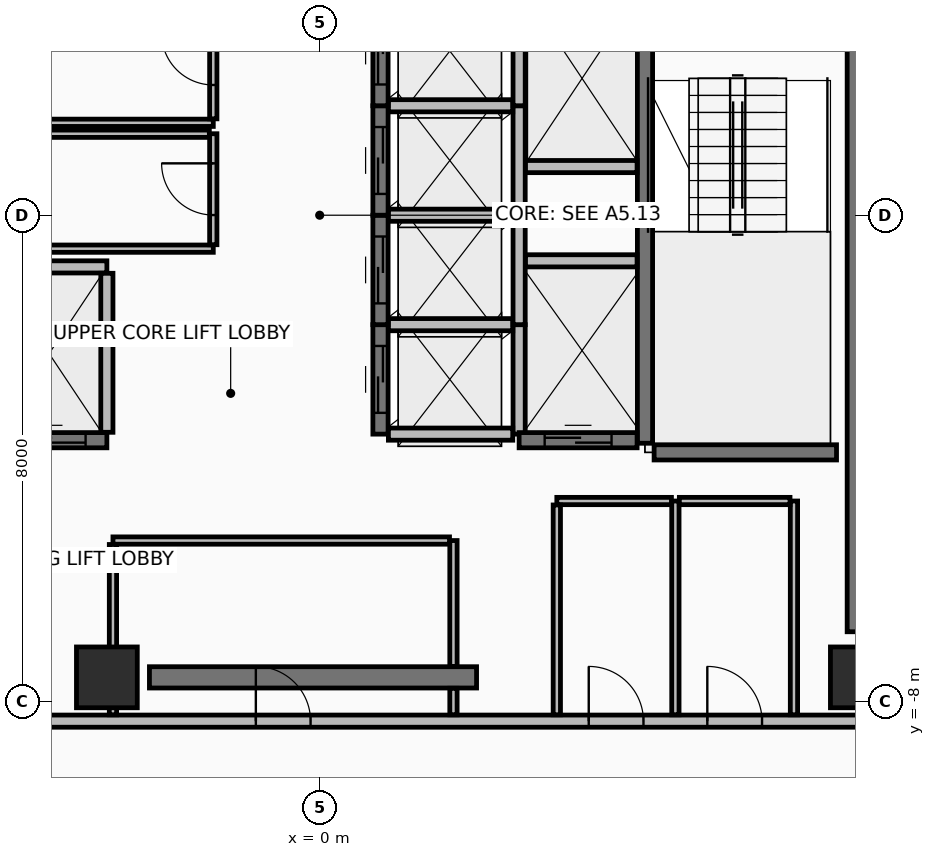
"""IFC4 building model, lengths in metres.
Left out: names, types, materials, properties, quantities, classifications, styles, units other than length and angle.
Written with IfcOpenShell. Run it as: python <this file> out.ifc"""

import sys

from ifc_helpers import new_model, si_unit, direction, frame, frame_2d, origin, origin_2d, place, context, subcontext, project, spatial, rectangle, extrude, element, fill, save


model = new_model("IFC4")
c1 = context("Model", 3, precision=1e-05, world=origin(), true_north=direction((0.0, 1.0)))
c2 = subcontext(c1, "Body", "Model", "MODEL_VIEW")
j1 = project(units=[si_unit("LENGTHUNIT", "METRE"), si_unit("PLANEANGLEUNIT", "RADIAN")], contexts=[c1])
p1 = place(None, origin())
s1 = spatial("IfcSite", under=j1, at=p1, CompositionType="ELEMENT")
p2 = place(p1, origin())
s2 = spatial("IfcBuilding", under=s1, at=p2, CompositionType="ELEMENT")
p3 = place(p2, frame((0.0, 0.0, 283.4)))
s3 = spatial("IfcBuildingStorey", under=s2, at=p3, CompositionType="ELEMENT", Elevation=283.4)
for number, where, z_axis, x_axis in (
    (1, (-3.5, -7.6, 0.0), (0.0, 0.0, 1.0), (1.0, 0.0, 0.0)),
    (2, (8.9, -7.6, 0.0), (0.0, 0.0, 1.0), (1.0, 0.0, 0.0)),
):
    element("IfcColumn", number, at=place(p3, frame(where, z_axis=z_axis, x_axis=x_axis)), inside=s3, PredefinedType="COLUMN", context=c2, shape_type="SweptSolid", body=[
        extrude(rectangle(XDim=1.0, YDim=1.0, at=origin_2d()), origin(), (0.0, 0.0, 1.0), 3.65),
    ])
p4 = place(p3, frame((-2.8, -7.6, 0.0), z_axis=(0.0, 0.0, 1.0), x_axis=(1.0, 0.0, 0.0)))
e3 = element("IfcWall", 3, at=p4, inside=s3, PredefinedType="SHEAR", context=c2, shape_type="SweptSolid", body=[
    extrude(rectangle(XDim=5.38, YDim=0.35, at=frame_2d((2.69, 0.0))), origin(), (0.0, 0.0, 1.0), 3.465),
])
p5 = place(p3, frame((8.9, -6.85, 0.0), z_axis=(0.0, 0.0, 1.0), x_axis=(0.0, 1.0, 0.0)))
e4 = element("IfcWall", 4, at=p5, inside=s3, PredefinedType="SHEAR", context=c2, shape_type="SweptSolid", body=[
    extrude(rectangle(XDim=10.7, YDim=0.45, at=frame_2d((5.35, 0.0))), origin(), (0.0, 0.0, 1.0), 3.465),
])
p6 = place(p3, frame((-9.62, -8.32, 0.0), z_axis=(0.0, 0.0, 1.0), x_axis=(1.0, 0.0, 0.0)))
e5 = element("IfcWall", 5, at=p6, inside=s3, PredefinedType="PARTITIONING", context=c2, shape_type="SweptSolid", body=[
    extrude(rectangle(XDim=19.24, YDim=0.2, at=frame_2d((9.62, 0.0))), origin(), (0.0, 0.0, 1.0), 2.96),
])
p7 = place(p6, frame((8.57, 0.0, 0.0)))
e6 = element("IfcOpeningElement", 6, at=p7, cuts=e5, PredefinedType="OPENING", context=c2, shape_type="SweptSolid", body=[
    extrude(rectangle(XDim=0.9, YDim=2.1, at=frame_2d((0.45, 1.05))), frame((0.0, 0.11, 0.0), z_axis=(0.0, -1.0, 0.0), x_axis=(1.0, 0.0, 0.0)), (0.0, 0.0, 1.0), 0.22),
])
p8 = place(p6, frame((14.045, 0.0, 0.0)))
e7 = element("IfcOpeningElement", 7, at=p8, cuts=e5, PredefinedType="OPENING", context=c2, shape_type="SweptSolid", body=[
    extrude(rectangle(XDim=0.9, YDim=2.1, at=frame_2d((0.45, 1.05))), frame((0.0, 0.11, 0.0), z_axis=(0.0, -1.0, 0.0), x_axis=(1.0, 0.0, 0.0)), (0.0, 0.0, 1.0), 0.22),
])
p9 = place(p6, frame((15.995, 0.0, 0.0)))
e8 = element("IfcOpeningElement", 8, at=p9, cuts=e5, PredefinedType="OPENING", context=c2, shape_type="SweptSolid", body=[
    extrude(rectangle(XDim=0.9, YDim=2.1, at=frame_2d((0.45, 1.05))), frame((0.0, 0.11, 0.0), z_axis=(0.0, -1.0, 0.0), x_axis=(1.0, 0.0, 0.0)), (0.0, 0.0, 1.0), 0.22),
])
p10 = place(p3, frame((5.35, -3.75, 0.0), z_axis=(0.0, 0.0, 1.0), x_axis=(0.0, 1.0, 0.0)))
e9 = element("IfcWall", 9, at=p10, inside=s3, PredefinedType="SHEAR", context=c2, shape_type="SweptSolid", body=[
    extrude(rectangle(XDim=7.3, YDim=0.25, at=frame_2d((3.65, 0.0))), origin(), (0.0, 0.0, 1.0), 3.465),
])
p11 = place(p3, frame((5.5, -3.9, 0.0), z_axis=(0.0, 0.0, 1.0), x_axis=(1.0, 0.0, 0.0)))
e10 = element("IfcWall", 10, at=p11, inside=s3, PredefinedType="SHEAR", context=c2, shape_type="SweptSolid", body=[
    extrude(rectangle(XDim=3.0, YDim=0.25, at=frame_2d((1.5, 0.0))), origin(), (0.0, 0.0, 1.0), 3.465),
])
p12 = place(p3, frame((1.0, -3.6, 0.0), z_axis=(0.0, 0.0, 1.0), x_axis=(0.0, 1.0, 0.0)))
e11 = element("IfcWall", 11, at=p12, inside=s3, PredefinedType="SHEAR", context=c2, shape_type="SweptSolid", body=[
    extrude(rectangle(XDim=1.8, YDim=0.25, at=frame_2d((0.9, 0.0))), origin(), (0.0, 0.0, 1.0), 3.465),
])
p13 = place(p12, frame((0.35, 0.0, 0.0)))
e12 = element("IfcOpeningElement", 12, at=p13, cuts=e11, PredefinedType="OPENING", context=c2, shape_type="SweptSolid", body=[
    extrude(rectangle(XDim=1.1, YDim=2.2, at=frame_2d((0.55, 1.1))), frame((0.0, 0.135, 0.0), z_axis=(0.0, -1.0, 0.0), x_axis=(1.0, 0.0, 0.0)), (0.0, 0.0, 1.0), 0.27),
])
p14 = place(p3, frame((3.28, -3.6, 0.0), z_axis=(0.0, 0.0, 1.0), x_axis=(0.0, 1.0, 0.0)))
e13 = element("IfcWall", 13, at=p14, inside=s3, PredefinedType="PARTITIONING", context=c2, shape_type="SweptSolid", body=[
    extrude(rectangle(XDim=1.8, YDim=0.2, at=frame_2d((0.9, 0.0))), origin(), (0.0, 0.0, 1.0), 3.465),
])
for number, where, z_axis, x_axis in (
    (14, (1.13, -3.6, 0.0), (0.0, 0.0, 1.0), (1.0, 0.0, 0.0)),
    (15, (1.13, -1.8, 0.0), (0.0, 0.0, 1.0), (1.0, 0.0, 0.0)),
):
    element("IfcWall", number, at=place(p3, frame(where, z_axis=z_axis, x_axis=x_axis)), inside=s3, PredefinedType="PARTITIONING", context=c2, shape_type="SweptSolid", body=[
        extrude(rectangle(XDim=2.045, YDim=0.2, at=frame_2d((1.022, 0.0))), origin(), (0.0, 0.0, 1.0), 3.465),
    ])
p15 = place(p3, frame((1.0, -1.8, 0.0), z_axis=(0.0, 0.0, 1.0), x_axis=(0.0, 1.0, 0.0)))
e16 = element("IfcWall", 16, at=p15, inside=s3, PredefinedType="SHEAR", context=c2, shape_type="SweptSolid", body=[
    extrude(rectangle(XDim=1.8, YDim=0.25, at=frame_2d((0.9, 0.0))), origin(), (0.0, 0.0, 1.0), 3.465),
])
p16 = place(p15, frame((0.35, 0.0, 0.0)))
e17 = element("IfcOpeningElement", 17, at=p16, cuts=e16, PredefinedType="OPENING", context=c2, shape_type="SweptSolid", body=[
    extrude(rectangle(XDim=1.1, YDim=2.2, at=frame_2d((0.55, 1.1))), frame((0.0, 0.135, 0.0), z_axis=(0.0, -1.0, 0.0), x_axis=(1.0, 0.0, 0.0)), (0.0, 0.0, 1.0), 0.27),
])
p17 = place(p3, frame((3.28, -1.8, 0.0), z_axis=(0.0, 0.0, 1.0), x_axis=(0.0, 1.0, 0.0)))
e18 = element("IfcWall", 18, at=p17, inside=s3, PredefinedType="PARTITIONING", context=c2, shape_type="SweptSolid", body=[
    extrude(rectangle(XDim=1.8, YDim=0.2, at=frame_2d((0.9, 0.0))), origin(), (0.0, 0.0, 1.0), 3.465),
])
p18 = place(p3, frame((1.13, 0.0, 0.0), z_axis=(0.0, 0.0, 1.0), x_axis=(1.0, 0.0, 0.0)))
e19 = element("IfcWall", 19, at=p18, inside=s3, PredefinedType="PARTITIONING", context=c2, shape_type="SweptSolid", body=[
    extrude(rectangle(XDim=2.045, YDim=0.2, at=frame_2d((1.022, 0.0))), origin(), (0.0, 0.0, 1.0), 3.465),
])
p19 = place(p3, frame((1.0, 0.0, 0.0), z_axis=(0.0, 0.0, 1.0), x_axis=(0.0, 1.0, 0.0)))
e20 = element("IfcWall", 20, at=p19, inside=s3, PredefinedType="SHEAR", context=c2, shape_type="SweptSolid", body=[
    extrude(rectangle(XDim=1.8, YDim=0.25, at=frame_2d((0.9, 0.0))), origin(), (0.0, 0.0, 1.0), 3.465),
])
p20 = place(p19, frame((0.35, 0.0, 0.0)))
e21 = element("IfcOpeningElement", 21, at=p20, cuts=e20, PredefinedType="OPENING", context=c2, shape_type="SweptSolid", body=[
    extrude(rectangle(XDim=1.1, YDim=2.2, at=frame_2d((0.55, 1.1))), frame((0.0, 0.135, 0.0), z_axis=(0.0, -1.0, 0.0), x_axis=(1.0, 0.0, 0.0)), (0.0, 0.0, 1.0), 0.27),
])
p21 = place(p3, frame((3.28, 0.0, 0.0), z_axis=(0.0, 0.0, 1.0), x_axis=(0.0, 1.0, 0.0)))
e22 = element("IfcWall", 22, at=p21, inside=s3, PredefinedType="PARTITIONING", context=c2, shape_type="SweptSolid", body=[
    extrude(rectangle(XDim=1.8, YDim=0.2, at=frame_2d((0.9, 0.0))), origin(), (0.0, 0.0, 1.0), 3.465),
])
p22 = place(p3, frame((1.13, 1.8, 0.0), z_axis=(0.0, 0.0, 1.0), x_axis=(1.0, 0.0, 0.0)))
e23 = element("IfcWall", 23, at=p22, inside=s3, PredefinedType="PARTITIONING", context=c2, shape_type="SweptSolid", body=[
    extrude(rectangle(XDim=2.045, YDim=0.2, at=frame_2d((1.022, 0.0))), origin(), (0.0, 0.0, 1.0), 3.465),
])
p23 = place(p3, frame((1.0, 1.8, 0.0), z_axis=(0.0, 0.0, 1.0), x_axis=(0.0, 1.0, 0.0)))
e24 = element("IfcWall", 24, at=p23, inside=s3, PredefinedType="SHEAR", context=c2, shape_type="SweptSolid", body=[
    extrude(rectangle(XDim=1.8, YDim=0.25, at=frame_2d((0.9, 0.0))), origin(), (0.0, 0.0, 1.0), 3.465),
])
p24 = place(p23, frame((0.35, 0.0, 0.0)))
e25 = element("IfcOpeningElement", 25, at=p24, cuts=e24, PredefinedType="OPENING", context=c2, shape_type="SweptSolid", body=[
    extrude(rectangle(XDim=1.1, YDim=2.2, at=frame_2d((0.55, 1.1))), frame((0.0, 0.135, 0.0), z_axis=(0.0, -1.0, 0.0), x_axis=(1.0, 0.0, 0.0)), (0.0, 0.0, 1.0), 0.27),
])
p25 = place(p3, frame((3.28, 1.8, 0.0), z_axis=(0.0, 0.0, 1.0), x_axis=(0.0, 1.0, 0.0)))
e26 = element("IfcWall", 26, at=p25, inside=s3, PredefinedType="PARTITIONING", context=c2, shape_type="SweptSolid", body=[
    extrude(rectangle(XDim=1.8, YDim=0.2, at=frame_2d((0.9, 0.0))), origin(), (0.0, 0.0, 1.0), 3.465),
])
p26 = place(p3, frame((-5.4, -3.7, 0.0), z_axis=(0.0, 0.0, 1.0), x_axis=(1.0, 0.0, 0.0)))
e27 = element("IfcWall", 27, at=p26, inside=s3, PredefinedType="SHEAR", context=c2, shape_type="SweptSolid", body=[
    extrude(rectangle(XDim=1.9, YDim=0.25, at=frame_2d((0.95, 0.0))), origin(), (0.0, 0.0, 1.0), 3.465),
])
p27 = place(p26, frame((0.35, 0.0, 0.0)))
e28 = element("IfcOpeningElement", 28, at=p27, cuts=e27, PredefinedType="OPENING", context=c2, shape_type="SweptSolid", body=[
    extrude(rectangle(XDim=1.2, YDim=2.2, at=frame_2d((0.6, 1.1))), frame((0.0, 0.135, 0.0), z_axis=(0.0, -1.0, 0.0), x_axis=(1.0, 0.0, 0.0)), (0.0, 0.0, 1.0), 0.27),
])
p28 = place(p3, frame((-5.27, -0.85, 0.0), z_axis=(0.0, 0.0, 1.0), x_axis=(1.0, 0.0, 0.0)))
e29 = element("IfcWall", 29, at=p28, inside=s3, PredefinedType="PARTITIONING", context=c2, shape_type="SweptSolid", body=[
    extrude(rectangle(XDim=1.77, YDim=0.2, at=frame_2d((0.885, 0.0))), origin(), (0.0, 0.0, 1.0), 3.465),
])
p29 = place(p3, frame((-3.5, -3.57, 0.0), z_axis=(0.0, 0.0, 1.0), x_axis=(0.0, 1.0, 0.0)))
e30 = element("IfcWall", 30, at=p29, inside=s3, PredefinedType="PARTITIONING", context=c2, shape_type="SweptSolid", body=[
    extrude(rectangle(XDim=2.615, YDim=0.2, at=frame_2d((1.308, 0.0))), origin(), (0.0, 0.0, 1.0), 3.465),
])
p30 = place(p3, frame((3.385, 0.8, 0.0), z_axis=(0.0, 0.0, 1.0), x_axis=(1.0, 0.0, 0.0)))
e31 = element("IfcWall", 31, at=p30, inside=s3, PredefinedType="PARTITIONING", context=c2, shape_type="SweptSolid", body=[
    extrude(rectangle(XDim=1.835, YDim=0.2, at=frame_2d((0.917, 0.0))), origin(), (0.0, 0.0, 1.0), 3.465),
])
p31 = place(p3, frame((3.28, -3.7, 0.0), z_axis=(0.0, 0.0, 1.0), x_axis=(1.0, 0.0, 0.0)))
e32 = element("IfcWall", 32, at=p31, inside=s3, PredefinedType="SHEAR", context=c2, shape_type="SweptSolid", body=[
    extrude(rectangle(XDim=1.94, YDim=0.25, at=frame_2d((0.97, 0.0))), origin(), (0.0, 0.0, 1.0), 3.465),
])
p32 = place(p31, frame((0.42, 0.0, 0.0)))
e33 = element("IfcOpeningElement", 33, at=p32, cuts=e32, PredefinedType="OPENING", context=c2, shape_type="SweptSolid", body=[
    extrude(rectangle(XDim=1.1, YDim=2.2, at=frame_2d((0.55, 1.1))), frame((0.0, 0.135, 0.0), z_axis=(0.0, -1.0, 0.0), x_axis=(1.0, 0.0, 0.0)), (0.0, 0.0, 1.0), 0.27),
])
p33 = place(p3, frame((3.385, -0.75, 0.0), z_axis=(0.0, 0.0, 1.0), x_axis=(1.0, 0.0, 0.0)))
e34 = element("IfcWall", 34, at=p33, inside=s3, PredefinedType="PARTITIONING", context=c2, shape_type="SweptSolid", body=[
    extrude(rectangle(XDim=1.835, YDim=0.2, at=frame_2d((0.917, 0.0))), origin(), (0.0, 0.0, 1.0), 3.465),
])
p34 = place(p3, frame((-5.22, 1.52, 0.0), z_axis=(0.0, 0.0, 1.0), x_axis=(1.0, 0.0, 0.0)))
e35 = element("IfcWall", 35, at=p34, inside=s3, PredefinedType="PARTITIONING", context=c2, shape_type="SweptSolid", body=[
    extrude(rectangle(XDim=3.47, YDim=0.12, at=frame_2d((1.735, 0.0))), origin(), (0.0, 0.0, 1.0), 3.465),
])
p35 = place(p3, frame((-1.75, 1.585, 0.0), z_axis=(0.0, 0.0, 1.0), x_axis=(0.0, 1.0, 0.0)))
e36 = element("IfcWall", 36, at=p35, inside=s3, PredefinedType="PARTITIONING", context=c2, shape_type="SweptSolid", body=[
    extrude(rectangle(XDim=1.965, YDim=0.12, at=frame_2d((0.982, 0.0))), origin(), (0.0, 0.0, 1.0), 3.465),
])
p36 = place(p35, frame((0.557, 0.0, 0.0)))
e37 = element("IfcOpeningElement", 37, at=p36, cuts=e36, PredefinedType="OPENING", context=c2, shape_type="SweptSolid", body=[
    extrude(rectangle(XDim=0.85, YDim=2.1, at=frame_2d((0.425, 1.05))), frame((0.0, 0.07, 0.0), z_axis=(0.0, -1.0, 0.0), x_axis=(1.0, 0.0, 0.0)), (0.0, 0.0, 1.0), 0.14),
])
p37 = place(p3, frame((-5.22, -0.55, 0.0), z_axis=(0.0, 0.0, 1.0), x_axis=(1.0, 0.0, 0.0)))
e38 = element("IfcWall", 38, at=p37, inside=s3, PredefinedType="PARTITIONING", context=c2, shape_type="SweptSolid", body=[
    extrude(rectangle(XDim=3.47, YDim=0.12, at=frame_2d((1.735, 0.0))), origin(), (0.0, 0.0, 1.0), 3.465),
])
p38 = place(p3, frame((-1.75, -0.485, 0.0), z_axis=(0.0, 0.0, 1.0), x_axis=(0.0, 1.0, 0.0)))
e39 = element("IfcWall", 39, at=p38, inside=s3, PredefinedType="PARTITIONING", context=c2, shape_type="SweptSolid", body=[
    extrude(rectangle(XDim=1.825, YDim=0.12, at=frame_2d((0.913, 0.0))), origin(), (0.0, 0.0, 1.0), 3.465),
])
p39 = place(p38, frame((0.488, 0.0, 0.0)))
e40 = element("IfcOpeningElement", 40, at=p39, cuts=e39, PredefinedType="OPENING", context=c2, shape_type="SweptSolid", body=[
    extrude(rectangle(XDim=0.85, YDim=2.1, at=frame_2d((0.425, 1.05))), frame((0.0, 0.07, 0.0), z_axis=(0.0, -1.0, 0.0), x_axis=(1.0, 0.0, 0.0)), (0.0, 0.0, 1.0), 0.14),
])
p40 = place(p3, frame((-1.815, 1.34, 0.0), z_axis=(0.0, 0.0, 1.0), x_axis=(-1.0, 0.0, 0.0)))
e41 = element("IfcWall", 41, at=p40, inside=s3, PredefinedType="PARTITIONING", context=c2, shape_type="SweptSolid", body=[
    extrude(rectangle(XDim=3.405, YDim=0.12, at=frame_2d((1.703, 0.0))), origin(), (0.0, 0.0, 1.0), 3.465),
])
p41 = place(p3, frame((2.2, -8.215, 0.0), z_axis=(0.0, 0.0, 1.0), x_axis=(0.0, 1.0, 0.0)))
e42 = element("IfcWall", 42, at=p41, inside=s3, PredefinedType="PARTITIONING", context=c2, shape_type="SweptSolid", body=[
    extrude(rectangle(XDim=0.435, YDim=0.12, at=frame_2d((0.218, 0.0))), origin(), (0.0, 0.0, 1.0), 2.76),
])
p42 = place(p3, frame((2.2, -7.42, 0.0), z_axis=(0.0, 0.0, 1.0), x_axis=(0.0, 1.0, 0.0)))
e43 = element("IfcWall", 43, at=p42, inside=s3, PredefinedType="PARTITIONING", context=c2, shape_type="SweptSolid", body=[
    extrude(rectangle(XDim=2.07, YDim=0.12, at=frame_2d((1.035, 0.0))), origin(), (0.0, 0.0, 1.0), 2.76),
])
p43 = place(p3, frame((2.135, -5.35, 0.0), z_axis=(0.0, 0.0, 1.0), x_axis=(-1.0, 0.0, 0.0)))
e44 = element("IfcWall", 44, at=p43, inside=s3, PredefinedType="PARTITIONING", context=c2, shape_type="SweptSolid", body=[
    extrude(rectangle(XDim=5.535, YDim=0.12, at=frame_2d((2.768, 0.0))), origin(), (0.0, 0.0, 1.0), 2.76),
])
p44 = place(p3, frame((-3.4, -5.415, 0.0), z_axis=(0.0, 0.0, 1.0), x_axis=(0.0, -1.0, 0.0)))
e45 = element("IfcWall", 45, at=p44, inside=s3, PredefinedType="PARTITIONING", context=c2, shape_type="SweptSolid", body=[
    extrude(rectangle(XDim=2.8, YDim=0.12, at=frame_2d((1.4, 0.0))), origin(), (0.0, 0.0, 1.0), 2.76),
])
p45 = place(p3, frame((5.85, -8.215, 0.0), z_axis=(0.0, 0.0, 1.0), x_axis=(0.0, 1.0, 0.0)))
e46 = element("IfcWall", 46, at=p45, inside=s3, PredefinedType="PARTITIONING", context=c2, shape_type="SweptSolid", body=[
    extrude(rectangle(XDim=3.515, YDim=0.12, at=frame_2d((1.758, 0.0))), origin(), (0.0, 0.0, 1.0), 2.76),
])
p46 = place(p3, frame((5.785, -4.7, 0.0), z_axis=(0.0, 0.0, 1.0), x_axis=(-1.0, 0.0, 0.0)))
e47 = element("IfcWall", 47, at=p46, inside=s3, PredefinedType="PARTITIONING", context=c2, shape_type="SweptSolid", body=[
    extrude(rectangle(XDim=1.885, YDim=0.12, at=frame_2d((0.942, 0.0))), origin(), (0.0, 0.0, 1.0), 3.465),
])
p47 = place(p3, frame((3.9, -4.765, 0.0), z_axis=(0.0, 0.0, 1.0), x_axis=(0.0, -1.0, 0.0)))
e48 = element("IfcWall", 48, at=p47, inside=s3, PredefinedType="PARTITIONING", context=c2, shape_type="SweptSolid", body=[
    extrude(rectangle(XDim=3.45, YDim=0.12, at=frame_2d((1.725, 0.0))), origin(), (0.0, 0.0, 1.0), 2.76),
])
p48 = place(p3, frame((7.8, -8.215, 0.0), z_axis=(0.0, 0.0, 1.0), x_axis=(0.0, 1.0, 0.0)))
e49 = element("IfcWall", 49, at=p48, inside=s3, PredefinedType="PARTITIONING", context=c2, shape_type="SweptSolid", body=[
    extrude(rectangle(XDim=3.515, YDim=0.12, at=frame_2d((1.758, 0.0))), origin(), (0.0, 0.0, 1.0), 2.76),
])
p49 = place(p3, frame((7.735, -4.7, 0.0), z_axis=(0.0, 0.0, 1.0), x_axis=(-1.0, 0.0, 0.0)))
e50 = element("IfcWall", 50, at=p49, inside=s3, PredefinedType="PARTITIONING", context=c2, shape_type="SweptSolid", body=[
    extrude(rectangle(XDim=1.82, YDim=0.12, at=frame_2d((0.91, 0.0))), origin(), (0.0, 0.0, 1.0), 3.465),
])
p50 = place(p3, frame((17.777, -3.807, 0.0), z_axis=(0.0, 0.0, 1.0), x_axis=(-0.309024581215, -0.951054051148, 0.0)))
e51 = element("IfcWall", 51, at=p50, inside=s3, PredefinedType="PARTITIONING", context=c2, shape_type="SweptSolid", body=[
    extrude(rectangle(XDim=30.614, YDim=0.15, at=frame_2d((15.307, 0.0))), origin(), (0.0, 0.0, 1.0), 3.465),
])
p51 = place(p13, origin())
e52 = element("IfcDoor", 52, at=p51, inside=s3, OperationType="SLIDING_TO_LEFT", PredefinedType="DOOR", context=c2, shape_type="SweptSolid", body=[
    extrude(rectangle(XDim=1.1, YDim=2.2, at=frame_2d((0.55, 1.1))), frame((0.0, 0.025, 0.0), z_axis=(0.0, -1.0, 0.0), x_axis=(1.0, 0.0, 0.0)), (0.0, 0.0, 1.0), 0.05),
])
fill(e12, e52)
p52 = place(p16, origin())
e53 = element("IfcDoor", 53, at=p52, inside=s3, OperationType="SLIDING_TO_LEFT", PredefinedType="DOOR", context=c2, shape_type="SweptSolid", body=[
    extrude(rectangle(XDim=1.1, YDim=2.2, at=frame_2d((0.55, 1.1))), frame((0.0, 0.025, 0.0), z_axis=(0.0, -1.0, 0.0), x_axis=(1.0, 0.0, 0.0)), (0.0, 0.0, 1.0), 0.05),
])
fill(e17, e53)
p53 = place(p20, origin())
e54 = element("IfcDoor", 54, at=p53, inside=s3, OperationType="SLIDING_TO_LEFT", PredefinedType="DOOR", context=c2, shape_type="SweptSolid", body=[
    extrude(rectangle(XDim=1.1, YDim=2.2, at=frame_2d((0.55, 1.1))), frame((0.0, 0.025, 0.0), z_axis=(0.0, -1.0, 0.0), x_axis=(1.0, 0.0, 0.0)), (0.0, 0.0, 1.0), 0.05),
])
fill(e21, e54)
p54 = place(p24, origin())
e55 = element("IfcDoor", 55, at=p54, inside=s3, OperationType="SLIDING_TO_LEFT", PredefinedType="DOOR", context=c2, shape_type="SweptSolid", body=[
    extrude(rectangle(XDim=1.1, YDim=2.2, at=frame_2d((0.55, 1.1))), frame((0.0, 0.025, 0.0), z_axis=(0.0, -1.0, 0.0), x_axis=(1.0, 0.0, 0.0)), (0.0, 0.0, 1.0), 0.05),
])
fill(e25, e55)
p55 = place(p27, origin())
e56 = element("IfcDoor", 56, at=p55, inside=s3, OperationType="SLIDING_TO_RIGHT", PredefinedType="DOOR", context=c2, shape_type="SweptSolid", body=[
    extrude(rectangle(XDim=1.2, YDim=2.2, at=frame_2d((0.6, 1.1))), frame((0.0, 0.025, 0.0), z_axis=(0.0, -1.0, 0.0), x_axis=(1.0, 0.0, 0.0)), (0.0, 0.0, 1.0), 0.05),
])
fill(e28, e56)
p56 = place(p32, origin())
e57 = element("IfcDoor", 57, at=p56, inside=s3, OperationType="SLIDING_TO_LEFT", PredefinedType="DOOR", context=c2, shape_type="SweptSolid", body=[
    extrude(rectangle(XDim=1.1, YDim=2.2, at=frame_2d((0.55, 1.1))), frame((0.0, 0.025, 0.0), z_axis=(0.0, -1.0, 0.0), x_axis=(1.0, 0.0, 0.0)), (0.0, 0.0, 1.0), 0.05),
])
fill(e33, e57)
p57 = place(p36, frame((0.85, 0.0, 0.0), z_axis=(0.0, 0.0, 1.0), x_axis=(-1.0, 0.0, 0.0)))
e58 = element("IfcDoor", 58, at=p57, inside=s3, OperationType="SINGLE_SWING_RIGHT", PredefinedType="DOOR", context=c2, shape_type="SweptSolid", body=[
    extrude(rectangle(XDim=0.85, YDim=2.1, at=frame_2d((0.425, 1.05))), frame((0.0, 0.025, 0.0), z_axis=(0.0, -1.0, 0.0), x_axis=(1.0, 0.0, 0.0)), (0.0, 0.0, 1.0), 0.05),
])
fill(e37, e58)
p58 = place(p39, frame((0.85, 0.0, 0.0), z_axis=(0.0, 0.0, 1.0), x_axis=(-1.0, 0.0, 0.0)))
e59 = element("IfcDoor", 59, at=p58, inside=s3, OperationType="SINGLE_SWING_RIGHT", PredefinedType="DOOR", context=c2, shape_type="SweptSolid", body=[
    extrude(rectangle(XDim=0.85, YDim=2.1, at=frame_2d((0.425, 1.05))), frame((0.0, 0.025, 0.0), z_axis=(0.0, -1.0, 0.0), x_axis=(1.0, 0.0, 0.0)), (0.0, 0.0, 1.0), 0.05),
])
fill(e40, e59)
p59 = place(p7, origin())
e60 = element("IfcDoor", 60, at=p59, inside=s3, OperationType="SINGLE_SWING_LEFT", PredefinedType="DOOR", context=c2, shape_type="SweptSolid", body=[
    extrude(rectangle(XDim=0.9, YDim=2.1, at=frame_2d((0.45, 1.05))), frame((0.0, 0.025, 0.0), z_axis=(0.0, -1.0, 0.0), x_axis=(1.0, 0.0, 0.0)), (0.0, 0.0, 1.0), 0.05),
])
fill(e6, e60)
p60 = place(p8, origin())
e61 = element("IfcDoor", 61, at=p60, inside=s3, OperationType="SINGLE_SWING_LEFT", PredefinedType="DOOR", context=c2, shape_type="SweptSolid", body=[
    extrude(rectangle(XDim=0.9, YDim=2.1, at=frame_2d((0.45, 1.05))), frame((0.0, 0.025, 0.0), z_axis=(0.0, -1.0, 0.0), x_axis=(1.0, 0.0, 0.0)), (0.0, 0.0, 1.0), 0.05),
])
fill(e7, e61)
p61 = place(p9, origin())
e62 = element("IfcDoor", 62, at=p61, inside=s3, OperationType="SINGLE_SWING_LEFT", PredefinedType="DOOR", context=c2, shape_type="SweptSolid", body=[
    extrude(rectangle(XDim=0.9, YDim=2.1, at=frame_2d((0.45, 1.05))), frame((0.0, 0.025, 0.0), z_axis=(0.0, -1.0, 0.0), x_axis=(1.0, 0.0, 0.0)), (0.0, 0.0, 1.0), 0.05),
])
fill(e8, e62)
save(model, sys.argv[1])
